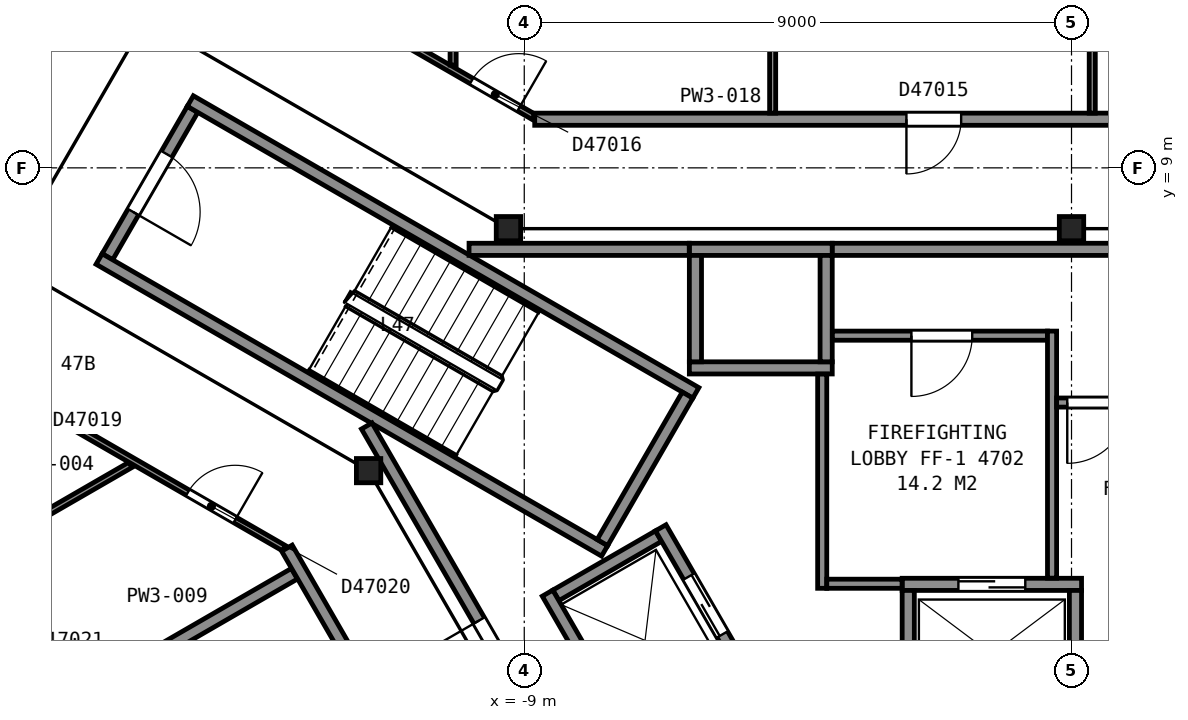
"""IFC4 building model, lengths in metres.
Left out: names, types, materials, properties, quantities, classifications, styles, units other than length and angle.
Written with IfcOpenShell. Run it as: python <this file> out.ifc"""

import sys

from ifc_helpers import new_model, si_unit, direction, frame, frame_2d, origin, origin_2d, place, context, subcontext, project, spatial, rectangle, i_section, extrude, element, fill, save


model = new_model("IFC4")
c1 = context("Model", 3, precision=1e-05, world=origin(), true_north=direction((0.0, 1.0)))
c2 = subcontext(c1, "Body", "Model", "MODEL_VIEW")
j1 = project(units=[si_unit("LENGTHUNIT", "METRE"), si_unit("PLANEANGLEUNIT", "RADIAN")], contexts=[c1])
p1 = place(None, origin())
s1 = spatial("IfcSite", under=j1, at=p1, CompositionType="ELEMENT")
p2 = place(p1, origin())
s2 = spatial("IfcBuilding", under=s1, at=p2, CompositionType="ELEMENT")
p3 = place(p2, frame((0.0, 0.0, 189.5)))
s3 = spatial("IfcBuildingStorey", under=s2, at=p3, CompositionType="ELEMENT", Elevation=189.5)
for number, where, z_axis, x_axis in (
    (1, (0.0, 8.0, 0.0), (0.0, 0.0, 1.0), (1.0, 0.0, 0.0)),
    (2, (-9.26, 8.0, 0.0), (0.0, 0.0, 1.0), (1.0, 0.0, 0.0)),
    (3, (-11.56, 4.02, 0.0), (0.0, 0.0, 1.0), (1.0, 0.0, 0.0)),
):
    element("IfcColumn", number, at=place(p3, frame(where, z_axis=z_axis, x_axis=x_axis)), inside=s3, PredefinedType="COLUMN", context=c2, shape_type="SweptSolid", body=[
        extrude(i_section(OverallWidth=0.401, OverallDepth=0.399, WebThickness=0.025, FlangeThickness=0.04, FilletRadius=0.015, at=origin_2d()), origin(), (0.0, 0.0, 1.0), 3.7),
    ])
p4 = place(p3, frame((-14.455, 9.962, 0.0), z_axis=(0.0, 0.0, 1.0), x_axis=(-0.500049511043, -0.865996816683, 0.0)))
e4 = element("IfcWall", 4, at=p4, inside=s3, PredefinedType="PARTITIONING", context=c2, shape_type="SweptSolid", body=[
    extrude(rectangle(XDim=2.8, YDim=0.2, at=frame_2d((1.4, 0.0))), origin(), (0.0, 0.0, 1.0), 3.45),
])
p5 = place(p4, frame((0.85, 0.0, 0.0)))
e5 = element("IfcOpeningElement", 5, at=p5, cuts=e4, PredefinedType="OPENING", context=c2, shape_type="SweptSolid", body=[
    extrude(rectangle(XDim=1.1, YDim=2.1, at=frame_2d((0.55, 1.05))), frame((0.0, 0.11, 0.0), z_axis=(0.0, -1.0, 0.0), x_axis=(1.0, 0.0, 0.0)), (0.0, 0.0, 1.0), 0.22),
])
for number, where, z_axis, x_axis in (
    (6, (-7.678, 2.701, 0.0), (0.0, 0.0, 1.0), (-0.866, 0.5, 0.0)),
    (7, (-6.178, 5.299, 0.0), (0.0, 0.0, 1.0), (-0.866, 0.5, 0.0)),
):
    element("IfcWall", number, at=place(p3, frame(where, z_axis=z_axis, x_axis=x_axis)), inside=s3, PredefinedType="PARTITIONING", context=c2, shape_type="SweptSolid", body=[
        extrude(rectangle(XDim=9.6, YDim=0.2, at=frame_2d((4.8, 0.0))), origin(), (0.0, 0.0, 1.0), 3.45),
    ])
p6 = place(p3, frame((-6.315, 5.262, 0.0), z_axis=(0.0, 0.0, 1.0), x_axis=(-0.500049511043, -0.865996816683, 0.0)))
e8 = element("IfcWall", 8, at=p6, inside=s3, PredefinedType="PARTITIONING", context=c2, shape_type="SweptSolid", body=[
    extrude(rectangle(XDim=2.8, YDim=0.2, at=frame_2d((1.4, 0.0))), origin(), (0.0, 0.0, 1.0), 3.45),
])
p7 = place(p3, frame((-2.785, 2.15, 0.0), z_axis=(0.0, 0.0, 1.0), x_axis=(1.0, 0.0, 0.0)))
e9 = element("IfcWall", 9, at=p7, inside=s3, PredefinedType="PARTITIONING", context=c2, shape_type="SweptSolid", body=[
    extrude(rectangle(XDim=2.95, YDim=0.2, at=frame_2d((1.475, 0.0))), origin(), (0.0, 0.0, 1.0), 3.7),
])
p8 = place(p7, frame((0.925, 0.0, 0.0)))
e10 = element("IfcOpeningElement", 10, at=p8, cuts=e9, PredefinedType="OPENING", context=c2, shape_type="SweptSolid", body=[
    extrude(rectangle(XDim=1.1, YDim=2.1, at=frame_2d((0.55, 1.05))), frame((0.0, 0.11, 0.0), z_axis=(0.0, -1.0, 0.0), x_axis=(1.0, 0.0, 0.0)), (0.0, 0.0, 1.0), 0.22),
])
for number, where, z_axis, x_axis in (
    (11, (-6.285, 5.71, 0.0), (0.0, 0.0, 1.0), (1.0, 0.0, 0.0)),
    (12, (-6.285, 7.66, 0.0), (0.0, 0.0, 1.0), (1.0, 0.0, 0.0)),
):
    element("IfcWall", number, at=place(p3, frame(where, z_axis=z_axis, x_axis=x_axis)), inside=s3, PredefinedType="PARTITIONING", context=c2, shape_type="SweptSolid", body=[
        extrude(rectangle(XDim=2.35, YDim=0.2, at=frame_2d((1.175, 0.0))), origin(), (0.0, 0.0, 1.0), 3.7),
    ])
for number, where, z_axis, x_axis in (
    (13, (-8.48, 1.969, 0.0), (0.0, 0.0, 1.0), (0.866, 0.5, 0.0)),
    (14, (0.065, 0.1, 0.0), (0.0, 0.0, 1.0), (0.0, 1.0, 0.0)),
    (15, (-2.685, 0.1, 0.0), (0.0, 0.0, 1.0), (0.0, 1.0, 0.0)),
):
    element("IfcWall", number, at=place(p3, frame(where, z_axis=z_axis, x_axis=x_axis)), inside=s3, PredefinedType="PARTITIONING", context=c2, shape_type="SweptSolid", body=[
        extrude(rectangle(XDim=1.95, YDim=0.2, at=frame_2d((0.975, 0.0))), origin(), (0.0, 0.0, 1.0), 3.7),
    ])
for number, where, z_axis, x_axis in (
    (16, (-4.035, 5.81, 0.0), (0.0, 0.0, 1.0), (0.0, 1.0, 0.0)),
    (17, (-6.185, 5.81, 0.0), (0.0, 0.0, 1.0), (0.0, 1.0, 0.0)),
):
    element("IfcWall", number, at=place(p3, frame(where, z_axis=z_axis, x_axis=x_axis)), inside=s3, PredefinedType="PARTITIONING", context=c2, shape_type="SweptSolid", body=[
        extrude(rectangle(XDim=1.75, YDim=0.2, at=frame_2d((0.875, 0.0))), origin(), (0.0, 0.0, 1.0), 3.7),
    ])
p9 = place(p3, frame((-5.28, 0.525, 0.0), z_axis=(0.0, 0.0, 1.0), x_axis=(-0.500037662692, 0.866003658127, 0.0)))
e18 = element("IfcWall", 18, at=p9, inside=s3, PredefinedType="PARTITIONING", context=c2, shape_type="SweptSolid", body=[
    extrude(rectangle(XDim=2.95, YDim=0.2, at=frame_2d((1.475, 0.0))), origin(), (0.0, 0.0, 1.0), 3.7),
])
p10 = place(p9, frame((0.925, 0.0, 0.0)))
e19 = element("IfcOpeningElement", 19, at=p10, cuts=e18, PredefinedType="OPENING", context=c2, shape_type="SweptSolid", body=[
    extrude(rectangle(XDim=1.1, YDim=2.1, at=frame_2d((0.55, 1.05))), frame((0.0, 0.11, 0.0), z_axis=(0.0, -1.0, 0.0), x_axis=(1.0, 0.0, 0.0)), (0.0, 0.0, 1.0), 0.22),
])
p11 = place(p3, frame((-7.242, -0.376, 0.0), z_axis=(0.0, 0.0, 1.0), x_axis=(-0.499996545922, 0.866027397988, 0.0)))
e20 = element("IfcWall", 20, at=p11, inside=s3, PredefinedType="PARTITIONING", context=c2, shape_type="SweptSolid", body=[
    extrude(rectangle(XDim=2.75, YDim=0.2, at=frame_2d((1.375, 0.0))), origin(), (0.0, 0.0, 1.0), 3.7),
])
p12 = place(p3, frame((-11.591, 4.755, 0.0), z_axis=(0.0, 0.0, 1.0), x_axis=(0.500043977787, -0.866000011708, 0.0)))
e21 = element("IfcWall", 21, at=p12, inside=s3, PredefinedType="PARTITIONING", context=c2, shape_type="SweptSolid", body=[
    extrude(rectangle(XDim=6.617, YDim=0.2, at=frame_2d((3.308, 0.0))), origin(), (0.0, 0.0, 1.0), 3.45),
])
p13 = place(p12, frame((3.695, 0.0, 0.0)))
e22 = element("IfcOpeningElement", 22, at=p13, cuts=e21, PredefinedType="OPENING", context=c2, shape_type="SweptSolid", body=[
    extrude(rectangle(XDim=1.8, YDim=2.1, at=frame_2d((0.9, 1.05))), frame((0.0, 0.11, 0.0), z_axis=(0.0, -1.0, 0.0), x_axis=(1.0, 0.0, 0.0)), (0.0, 0.0, 1.0), 0.22),
])
p14 = place(p3, frame((-9.908, 7.66, 0.0), z_axis=(0.0, 0.0, 1.0), x_axis=(1.0, 0.0, 0.0)))
e23 = element("IfcWall", 23, at=p14, inside=s3, PredefinedType="PARTITIONING", context=c2, shape_type="SweptSolid", body=[
    extrude(rectangle(XDim=3.621, YDim=0.2, at=frame_2d((1.811, 0.0))), origin(), (0.0, 0.0, 1.0), 3.45),
])
p15 = place(p3, frame((-4.1, 2.085, 0.0), z_axis=(0.0, 0.0, 1.0), x_axis=(0.0, 1.0, 0.0)))
e24 = element("IfcWall", 24, at=p15, inside=s3, PredefinedType="PARTITIONING", context=c2, shape_type="SweptSolid", body=[
    extrude(rectangle(XDim=3.523, YDim=0.15, at=frame_2d((1.761, 0.0))), origin(), (0.0, 0.0, 1.0), 3.45),
])
p16 = place(p3, frame((-4.025, 2.16, 0.0), z_axis=(0.0, 0.0, 1.0), x_axis=(1.0, 0.0, 0.0)))
e25 = element("IfcWall", 25, at=p16, inside=s3, PredefinedType="PARTITIONING", context=c2, shape_type="SweptSolid", body=[
    extrude(rectangle(XDim=1.238, YDim=0.15, at=frame_2d((0.619, 0.0))), origin(), (0.0, 0.0, 1.0), 3.45),
])
p17 = place(p3, frame((-3.933, 6.24, 0.0), z_axis=(0.0, 0.0, 1.0), x_axis=(1.0, 0.0, 0.0)))
e26 = element("IfcWall", 26, at=p17, inside=s3, PredefinedType="PARTITIONING", context=c2, shape_type="SweptSolid", body=[
    extrude(rectangle(XDim=3.538, YDim=0.15, at=frame_2d((1.769, 0.0))), origin(), (0.0, 0.0, 1.0), 3.45),
])
p18 = place(p17, frame((1.3, 0.0, 0.0)))
e27 = element("IfcOpeningElement", 27, at=p18, cuts=e26, PredefinedType="OPENING", context=c2, shape_type="SweptSolid", body=[
    extrude(rectangle(XDim=1.0, YDim=2.1, at=frame_2d((0.5, 1.05))), frame((0.0, 0.085, 0.0), z_axis=(0.0, -1.0, 0.0), x_axis=(1.0, 0.0, 0.0)), (0.0, 0.0, 1.0), 0.17),
])
p19 = place(p3, frame((-3.933, 7.66, 0.0), z_axis=(0.0, 0.0, 1.0), x_axis=(1.0, 0.0, 0.0)))
e28 = element("IfcWall", 28, at=p19, inside=s3, PredefinedType="PARTITIONING", context=c2, shape_type="SweptSolid", body=[
    extrude(rectangle(XDim=13.841, YDim=0.2, at=frame_2d((6.92, 0.0))), origin(), (0.0, 0.0, 1.0), 3.45),
])
p20 = place(p3, frame((-0.32, 2.252, 0.0), z_axis=(0.0, 0.0, 1.0), x_axis=(0.0, 1.0, 0.0)))
e29 = element("IfcWall", 29, at=p20, inside=s3, PredefinedType="PARTITIONING", context=c2, shape_type="SweptSolid", body=[
    extrude(rectangle(XDim=4.063, YDim=0.15, at=frame_2d((2.031, 0.0))), origin(), (0.0, 0.0, 1.0), 3.45),
])
p21 = place(p3, frame((-0.245, 5.14, 0.0), z_axis=(0.0, 0.0, 1.0), x_axis=(1.0, 0.0, 0.0)))
e30 = element("IfcWall", 30, at=p21, inside=s3, PredefinedType="PARTITIONING", context=c2, shape_type="SweptSolid", body=[
    extrude(rectangle(XDim=5.11, YDim=0.15, at=frame_2d((2.555, 0.0))), origin(), (0.0, 0.0, 1.0), 3.45),
])
p22 = place(p21, frame((0.175, 0.0, 0.0)))
e31 = element("IfcOpeningElement", 31, at=p22, cuts=e30, PredefinedType="OPENING", context=c2, shape_type="SweptSolid", body=[
    extrude(rectangle(XDim=1.0, YDim=2.1, at=frame_2d((0.5, 1.05))), frame((0.0, 0.085, 0.0), z_axis=(0.0, -1.0, 0.0), x_axis=(1.0, 0.0, 0.0)), (0.0, 0.0, 1.0), 0.17),
])
p23 = place(p3, frame((-21.53, 0.62, 0.0), z_axis=(0.0, 0.0, 1.0), x_axis=(0.865986079307, 0.500068105808, 0.0)))
e32 = element("IfcWall", 32, at=p23, inside=s3, PredefinedType="PARTITIONING", context=c2, shape_type="SweptSolid", body=[
    extrude(rectangle(XDim=6.99, YDim=0.1, at=frame_2d((3.495, 0.0))), origin(), (0.0, 0.0, 1.0), 2.713),
])
p24 = place(p3, frame((-19.955, 6.844, 0.0), z_axis=(0.0, 0.0, 1.0), x_axis=(0.500415732313, 0.865785247537, 0.0)))
e33 = element("IfcWall", 33, at=p24, inside=s3, PredefinedType="PARTITIONING", context=c2, shape_type="SweptSolid", body=[
    extrude(rectangle(XDim=8.097, YDim=0.1, at=frame_2d((4.049, 0.0))), origin(), (0.0, 0.0, 1.0), 2.713),
])
p25 = place(p24, frame((3.45, 0.0, 0.0)))
e34 = element("IfcOpeningElement", 34, at=p25, cuts=e33, PredefinedType="OPENING", context=c2, shape_type="SweptSolid", body=[
    extrude(rectangle(XDim=1.2, YDim=2.1, at=frame_2d((0.6, 1.05))), frame((0.0, 0.06, 0.0), z_axis=(0.0, -1.0, 0.0), x_axis=(1.0, 0.0, 0.0)), (0.0, 0.0, 1.0), 0.12),
])
p26 = place(p3, frame((-12.952, 2.744, 0.0), z_axis=(0.0, 0.0, 1.0), x_axis=(-0.86608949446, 0.499888975259, 0.0)))
e35 = element("IfcWall", 35, at=p26, inside=s3, PredefinedType="PARTITIONING", context=c2, shape_type="SweptSolid", body=[
    extrude(rectangle(XDim=8.165, YDim=0.1, at=frame_2d((4.083, 0.0))), origin(), (0.0, 0.0, 1.0), 2.713),
])
p27 = place(p26, frame((4.741, 0.0, 0.0)))
e36 = element("IfcOpeningElement", 36, at=p27, cuts=e35, PredefinedType="OPENING", context=c2, shape_type="SweptSolid", body=[
    extrude(rectangle(XDim=0.9, YDim=2.1, at=frame_2d((0.45, 1.05))), frame((0.0, 0.06, 0.0), z_axis=(0.0, -1.0, 0.0), x_axis=(1.0, 0.0, 0.0)), (0.0, 0.0, 1.0), 0.12),
])
p28 = place(p26, frame((0.928, 0.0, 0.0)))
e37 = element("IfcOpeningElement", 37, at=p28, cuts=e35, PredefinedType="OPENING", context=c2, shape_type="SweptSolid", body=[
    extrude(rectangle(XDim=0.9, YDim=2.1, at=frame_2d((0.45, 1.05))), frame((0.0, 0.06, 0.0), z_axis=(0.0, -1.0, 0.0), x_axis=(1.0, 0.0, 0.0)), (0.0, 0.0, 1.0), 0.12),
])
p29 = place(p3, frame((-15.921, 13.923, 0.0), z_axis=(0.0, 0.0, 1.0), x_axis=(0.866088973199, -0.499889878377, 0.0)))
e38 = element("IfcWall", 38, at=p29, inside=s3, PredefinedType="PARTITIONING", context=c2, shape_type="SweptSolid", body=[
    extrude(rectangle(XDim=8.163, YDim=0.1, at=frame_2d((4.082, 0.0))), origin(), (0.0, 0.0, 1.0), 2.713),
])
p30 = place(p29, frame((6.99, 0.0, 0.0)))
e39 = element("IfcOpeningElement", 39, at=p30, cuts=e38, PredefinedType="OPENING", context=c2, shape_type="SweptSolid", body=[
    extrude(rectangle(XDim=0.9, YDim=2.1, at=frame_2d((0.45, 1.05))), frame((0.0, 0.06, 0.0), z_axis=(0.0, -1.0, 0.0), x_axis=(1.0, 0.0, 0.0)), (0.0, 0.0, 1.0), 0.12),
])
p31 = place(p29, frame((3.172, 0.0, 0.0)))
e40 = element("IfcOpeningElement", 40, at=p31, cuts=e38, PredefinedType="OPENING", context=c2, shape_type="SweptSolid", body=[
    extrude(rectangle(XDim=0.9, YDim=2.1, at=frame_2d((0.45, 1.05))), frame((0.0, 0.06, 0.0), z_axis=(0.0, -1.0, 0.0), x_axis=(1.0, 0.0, 0.0)), (0.0, 0.0, 1.0), 0.12),
])
p32 = place(p3, frame((-15.589, 0.703, 0.0), z_axis=(0.0, 0.0, 1.0), x_axis=(0.86594479446, 0.500139593461, 0.0)))
e41 = element("IfcWall", 41, at=p32, inside=s3, PredefinedType="PARTITIONING", context=c2, shape_type="SweptSolid", body=[
    extrude(rectangle(XDim=3.242, YDim=0.2, at=frame_2d((1.621, 0.0))), origin(), (0.0, 0.0, 1.0), 2.713),
])
p33 = place(p3, frame((-4.075, -12.545, 0.0), z_axis=(0.0, 0.0, 1.0), x_axis=(-0.499999743747, 0.866025551732, 0.0)))
e42 = element("IfcWall", 42, at=p33, inside=s3, PredefinedType="PARTITIONING", context=c2, shape_type="SweptSolid", body=[
    extrude(rectangle(XDim=17.656, YDim=0.2, at=frame_2d((8.828, 0.0))), origin(), (0.0, 0.0, 1.0), 2.713),
])
p34 = place(p33, frame((10.83, 0.0, 0.0)))
e43 = element("IfcOpeningElement", 43, at=p34, cuts=e42, PredefinedType="OPENING", context=c2, shape_type="SweptSolid", body=[
    extrude(rectangle(XDim=0.9, YDim=2.1, at=frame_2d((0.45, 1.05))), frame((0.0, 0.11, 0.0), z_axis=(0.0, -1.0, 0.0), x_axis=(1.0, 0.0, 0.0)), (0.0, 0.0, 1.0), 0.22),
])
p35 = place(p33, frame((7.148, 0.0, 0.0)))
e44 = element("IfcOpeningElement", 44, at=p35, cuts=e42, PredefinedType="OPENING", context=c2, shape_type="SweptSolid", body=[
    extrude(rectangle(XDim=0.9, YDim=2.1, at=frame_2d((0.45, 1.05))), frame((0.0, 0.11, 0.0), z_axis=(0.0, -1.0, 0.0), x_axis=(1.0, 0.0, 0.0)), (0.0, 0.0, 1.0), 0.22),
])
p36 = place(p33, frame((2.198, 0.0, 0.0)))
e45 = element("IfcOpeningElement", 45, at=p36, cuts=e42, PredefinedType="OPENING", context=c2, shape_type="SweptSolid", body=[
    extrude(rectangle(XDim=0.9, YDim=2.1, at=frame_2d((0.45, 1.05))), frame((0.0, 0.11, 0.0), z_axis=(0.0, -1.0, 0.0), x_axis=(1.0, 0.0, 0.0)), (0.0, 0.0, 1.0), 0.22),
])
p37 = place(p3, frame((-10.17, 10.691, 0.0), z_axis=(0.0, 0.0, 1.0), x_axis=(0.0, 1.0, 0.0)))
e46 = element("IfcWall", 46, at=p37, inside=s3, PredefinedType="PARTITIONING", context=c2, shape_type="SweptSolid", body=[
    extrude(rectangle(XDim=7.644, YDim=0.1, at=frame_2d((3.822, 0.0))), origin(), (0.0, 0.0, 1.0), 2.713),
])
p38 = place(p3, frame((-8.828, 9.8, 0.0), z_axis=(0.0, 0.0, 1.0), x_axis=(1.0, 0.0, 0.0)))
e47 = element("IfcWall", 47, at=p38, inside=s3, PredefinedType="PARTITIONING", context=c2, shape_type="SweptSolid", body=[
    extrude(rectangle(XDim=17.706, YDim=0.2, at=frame_2d((8.853, 0.0))), origin(), (0.0, 0.0, 1.0), 2.713),
])
p39 = place(p38, frame((14.498, 0.0, 0.0)))
e48 = element("IfcOpeningElement", 48, at=p39, cuts=e47, PredefinedType="OPENING", context=c2, shape_type="SweptSolid", body=[
    extrude(rectangle(XDim=0.9, YDim=2.1, at=frame_2d((0.45, 1.05))), frame((0.0, 0.11, 0.0), z_axis=(0.0, -1.0, 0.0), x_axis=(1.0, 0.0, 0.0)), (0.0, 0.0, 1.0), 0.22),
])
p40 = place(p38, frame((10.919, 0.0, 0.0)))
e49 = element("IfcOpeningElement", 49, at=p40, cuts=e47, PredefinedType="OPENING", context=c2, shape_type="SweptSolid", body=[
    extrude(rectangle(XDim=0.9, YDim=2.1, at=frame_2d((0.45, 1.05))), frame((0.0, 0.11, 0.0), z_axis=(0.0, -1.0, 0.0), x_axis=(1.0, 0.0, 0.0)), (0.0, 0.0, 1.0), 0.22),
])
p41 = place(p38, frame((6.113, 0.0, 0.0)))
e50 = element("IfcOpeningElement", 50, at=p41, cuts=e47, PredefinedType="OPENING", context=c2, shape_type="SweptSolid", body=[
    extrude(rectangle(XDim=0.9, YDim=2.1, at=frame_2d((0.45, 1.05))), frame((0.0, 0.11, 0.0), z_axis=(0.0, -1.0, 0.0), x_axis=(1.0, 0.0, 0.0)), (0.0, 0.0, 1.0), 0.22),
])
for number, where, z_axis, x_axis in (
    (51, (-4.915, 9.9, 0.0), (0.0, 0.0, 1.0), (0.0, 1.0, 0.0)),
    (52, (0.341, 9.9, 0.0), (0.0, 0.0, 1.0), (0.0, 1.0, 0.0)),
):
    element("IfcWall", number, at=place(p3, frame(where, z_axis=z_axis, x_axis=x_axis)), inside=s3, PredefinedType="PARTITIONING", context=c2, shape_type="SweptSolid", body=[
        extrude(rectangle(XDim=8.435, YDim=0.1, at=frame_2d((4.218, 0.0))), origin(), (0.0, 0.0, 1.0), 2.713),
    ])
p42 = place(p5, origin())
e53 = element("IfcDoor", 53, at=p42, inside=s3, OperationType="SINGLE_SWING_RIGHT", PredefinedType="DOOR", context=c2, shape_type="SweptSolid", body=[
    extrude(rectangle(XDim=1.1, YDim=2.1, at=frame_2d((0.55, 1.05))), frame((0.0, 0.025, 0.0), z_axis=(0.0, -1.0, 0.0), x_axis=(1.0, 0.0, 0.0)), (0.0, 0.0, 1.0), 0.05),
])
fill(e5, e53)
p43 = place(p8, origin())
e54 = element("IfcDoor", 54, at=p43, inside=s3, OperationType="SLIDING_TO_LEFT", PredefinedType="DOOR", context=c2, shape_type="SweptSolid", body=[
    extrude(rectangle(XDim=1.1, YDim=2.1, at=frame_2d((0.55, 1.05))), frame((0.0, 0.025, 0.0), z_axis=(0.0, -1.0, 0.0), x_axis=(1.0, 0.0, 0.0)), (0.0, 0.0, 1.0), 0.05),
])
fill(e10, e54)
p44 = place(p10, origin())
e55 = element("IfcDoor", 55, at=p44, inside=s3, OperationType="SLIDING_TO_LEFT", PredefinedType="DOOR", context=c2, shape_type="SweptSolid", body=[
    extrude(rectangle(XDim=1.1, YDim=2.1, at=frame_2d((0.55, 1.05))), frame((0.0, 0.025, 0.0), z_axis=(0.0, -1.0, 0.0), x_axis=(1.0, 0.0, 0.0)), (0.0, 0.0, 1.0), 0.05),
])
fill(e19, e55)
p45 = place(p13, origin())
e56 = element("IfcDoor", 56, at=p45, inside=s3, OperationType="DOUBLE_DOOR_SINGLE_SWING", PredefinedType="DOOR", context=c2, shape_type="SweptSolid", body=[
    extrude(rectangle(XDim=1.8, YDim=2.1, at=frame_2d((0.9, 1.05))), frame((0.0, 0.025, 0.0), z_axis=(0.0, -1.0, 0.0), x_axis=(1.0, 0.0, 0.0)), (0.0, 0.0, 1.0), 0.05),
])
fill(e22, e56)
p46 = place(p18, origin())
e57 = element("IfcDoor", 57, at=p46, inside=s3, OperationType="SINGLE_SWING_LEFT", PredefinedType="DOOR", context=c2, shape_type="SweptSolid", body=[
    extrude(rectangle(XDim=1.0, YDim=2.1, at=frame_2d((0.5, 1.05))), frame((0.0, 0.025, 0.0), z_axis=(0.0, -1.0, 0.0), x_axis=(1.0, 0.0, 0.0)), (0.0, 0.0, 1.0), 0.05),
])
fill(e27, e57)
p47 = place(p22, origin())
e58 = element("IfcDoor", 58, at=p47, inside=s3, OperationType="SINGLE_SWING_LEFT", PredefinedType="DOOR", context=c2, shape_type="SweptSolid", body=[
    extrude(rectangle(XDim=1.0, YDim=2.1, at=frame_2d((0.5, 1.05))), frame((0.0, 0.025, 0.0), z_axis=(0.0, -1.0, 0.0), x_axis=(1.0, 0.0, 0.0)), (0.0, 0.0, 1.0), 0.05),
])
fill(e31, e58)
p48 = place(p28, origin())
e59 = element("IfcDoor", 59, at=p48, inside=s3, OperationType="SINGLE_SWING_LEFT", PredefinedType="DOOR", context=c2, shape_type="SweptSolid", body=[
    extrude(rectangle(XDim=0.9, YDim=2.1, at=frame_2d((0.45, 1.05))), frame((0.0, 0.025, 0.0), z_axis=(0.0, -1.0, 0.0), x_axis=(1.0, 0.0, 0.0)), (0.0, 0.0, 1.0), 0.05),
])
fill(e37, e59)
p49 = place(p30, origin())
e60 = element("IfcDoor", 60, at=p49, inside=s3, OperationType="SINGLE_SWING_RIGHT", PredefinedType="DOOR", context=c2, shape_type="SweptSolid", body=[
    extrude(rectangle(XDim=0.9, YDim=2.1, at=frame_2d((0.45, 1.05))), frame((0.0, 0.025, 0.0), z_axis=(0.0, -1.0, 0.0), x_axis=(1.0, 0.0, 0.0)), (0.0, 0.0, 1.0), 0.05),
])
fill(e39, e60)
p50 = place(p41, origin())
e61 = element("IfcDoor", 61, at=p50, inside=s3, OperationType="SINGLE_SWING_LEFT", PredefinedType="DOOR", context=c2, shape_type="SweptSolid", body=[
    extrude(rectangle(XDim=0.9, YDim=2.1, at=frame_2d((0.45, 1.05))), frame((0.0, 0.025, 0.0), z_axis=(0.0, -1.0, 0.0), x_axis=(1.0, 0.0, 0.0)), (0.0, 0.0, 1.0), 0.05),
])
fill(e50, e61)
save(model, sys.argv[1])
